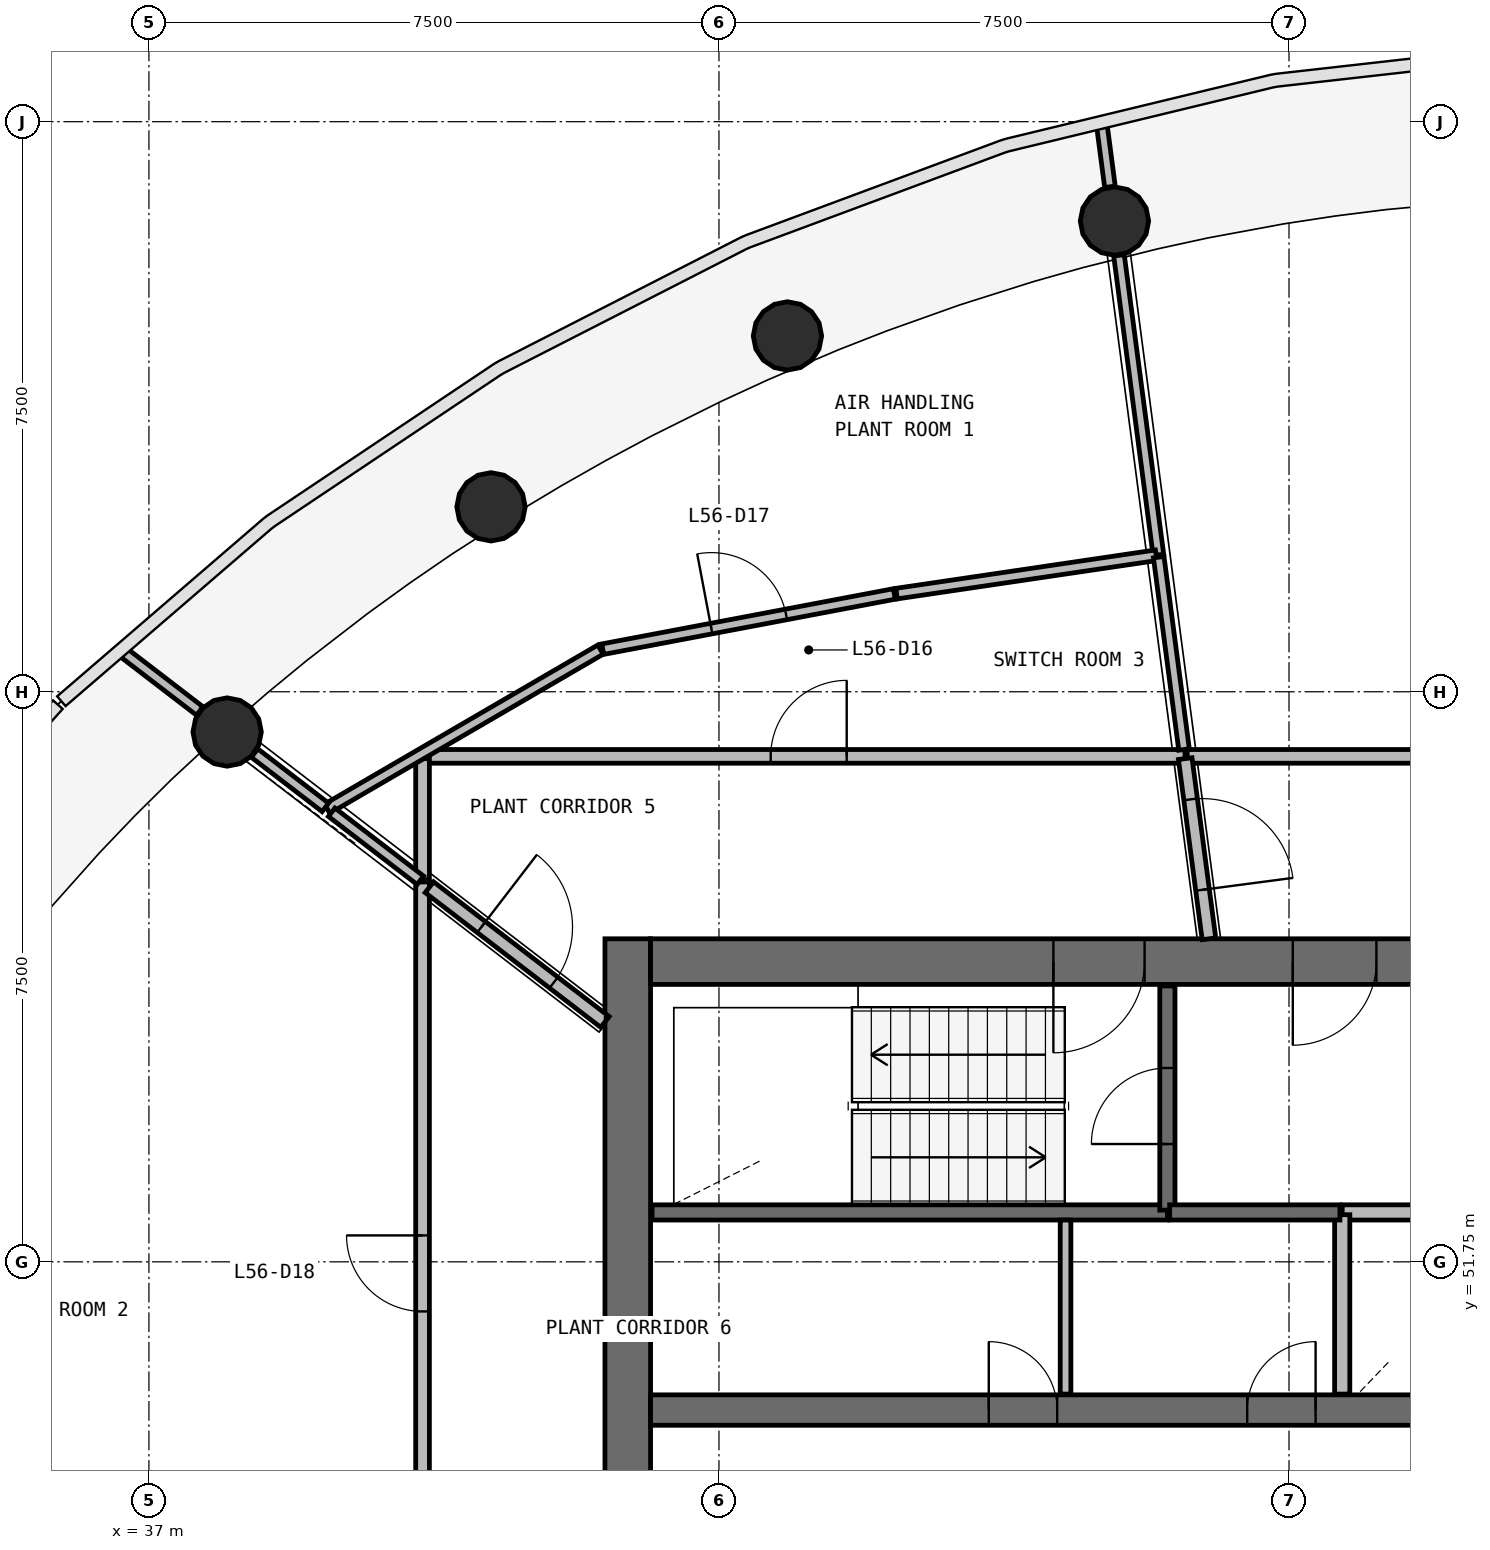
"""IFC4 building model, lengths in metres.
Left out: names, types, materials, properties, quantities, classifications, styles, units other than length and angle.
Written with IfcOpenShell. Run it as: python <this file> out.ifc"""

import sys

from ifc_helpers import new_model, si_unit, direction, frame, frame_2d, origin, origin_2d, place, context, subcontext, project, spatial, rectangle, circle, extrude, source, transform, mapped, element, fill, save


model = new_model("IFC4")
c1 = context("Model", 3, precision=1e-05, world=origin(), true_north=direction((0.0, 1.0)))
c2 = subcontext(c1, "Body", "Model", "MODEL_VIEW")
j1 = project(units=[si_unit("LENGTHUNIT", "METRE"), si_unit("PLANEANGLEUNIT", "RADIAN")], contexts=[c1])
p1 = place(None, origin())
s1 = spatial("IfcSite", under=j1, at=p1, CompositionType="ELEMENT")
p2 = place(p1, origin())
s2 = spatial("IfcBuilding", under=s1, at=p2, CompositionType="ELEMENT")
p3 = place(p2, frame((0.0, 0.0, 230.6)))
s3 = spatial("IfcBuildingStorey", under=s2, at=p3, CompositionType="ELEMENT", Elevation=230.6)
p4 = place(p3, frame((43.3, 56.0, 0.0), z_axis=(0.0, 0.0, 1.0), x_axis=(0.0, -1.0, 0.0)))
e1 = element("IfcWall", 1, at=p4, inside=s3, PredefinedType="SHEAR", context=c2, shape_type="SweptSolid", body=[
    extrude(rectangle(XDim=16.0, YDim=0.6, at=frame_2d((8.0, 0.0))), origin(), (0.0, 0.0, 1.0), 3.9),
])
p5 = place(p4, frame((7.1, 0.0, 0.0)))
e2 = element("IfcOpeningElement", 2, at=p5, cuts=e1, PredefinedType="OPENING", context=c2, shape_type="SweptSolid", body=[
    extrude(rectangle(XDim=1.8, YDim=2.1, at=frame_2d((0.9, 1.05))), frame((0.0, 0.31, 0.0), z_axis=(0.0, -1.0, 0.0), x_axis=(1.0, 0.0, 0.0)), (0.0, 0.0, 1.0), 0.62),
])
p6 = place(p3, frame((60.4, 55.7, 0.0), z_axis=(0.0, 0.0, 1.0), x_axis=(-1.0, 0.0, 0.0)))
e3 = element("IfcWall", 3, at=p6, inside=s3, PredefinedType="SHEAR", context=c2, shape_type="SweptSolid", body=[
    extrude(rectangle(XDim=16.8, YDim=0.6, at=frame_2d((8.4, 0.0))), origin(), (0.0, 0.0, 1.0), 3.9),
])
p7 = place(p6, frame((0.4, 0.0, 0.0)))
e4 = element("IfcOpeningElement", 4, at=p7, cuts=e3, PredefinedType="OPENING", context=c2, shape_type="SweptSolid", body=[
    extrude(rectangle(XDim=1.1, YDim=2.1, at=frame_2d((0.55, 1.05))), frame((0.0, 0.31, 0.0), z_axis=(0.0, -1.0, 0.0), x_axis=(1.0, 0.0, 0.0)), (0.0, 0.0, 1.0), 0.62),
])
p8 = place(p6, frame((10.3, 0.0, 0.0)))
e5 = element("IfcOpeningElement", 5, at=p8, cuts=e3, PredefinedType="OPENING", context=c2, shape_type="SweptSolid", body=[
    extrude(rectangle(XDim=1.2, YDim=2.1, at=frame_2d((0.6, 1.05))), frame((0.0, 0.31, 0.0), z_axis=(0.0, -1.0, 0.0), x_axis=(1.0, 0.0, 0.0)), (0.0, 0.0, 1.0), 0.62),
])
p9 = place(p6, frame((7.25, 0.0, 0.0)))
e6 = element("IfcOpeningElement", 6, at=p9, cuts=e3, PredefinedType="OPENING", context=c2, shape_type="SweptSolid", body=[
    extrude(rectangle(XDim=1.1, YDim=2.1, at=frame_2d((0.55, 1.05))), frame((0.0, 0.31, 0.0), z_axis=(0.0, -1.0, 0.0), x_axis=(1.0, 0.0, 0.0)), (0.0, 0.0, 1.0), 0.62),
])
p10 = place(p3, frame((43.6, 49.8, 0.0), z_axis=(0.0, 0.0, 1.0), x_axis=(1.0, 0.0, 0.0)))
e7 = element("IfcWall", 7, at=p10, inside=s3, PredefinedType="SHEAR", context=c2, shape_type="SweptSolid", body=[
    extrude(rectangle(XDim=16.8, YDim=0.4, at=frame_2d((8.4, 0.0))), origin(), (0.0, 0.0, 1.0), 3.9),
])
p11 = place(p10, frame((4.45, 0.0, 0.0)))
e8 = element("IfcOpeningElement", 8, at=p11, cuts=e7, PredefinedType="OPENING", context=c2, shape_type="SweptSolid", body=[
    extrude(rectangle(XDim=0.9, YDim=2.1, at=frame_2d((0.45, 1.05))), frame((0.0, 0.21, 0.0), z_axis=(0.0, -1.0, 0.0), x_axis=(1.0, 0.0, 0.0)), (0.0, 0.0, 1.0), 0.42),
])
p12 = place(p10, frame((7.85, 0.0, 0.0)))
e9 = element("IfcOpeningElement", 9, at=p12, cuts=e7, PredefinedType="OPENING", context=c2, shape_type="SweptSolid", body=[
    extrude(rectangle(XDim=0.9, YDim=2.1, at=frame_2d((0.45, 1.05))), frame((0.0, 0.21, 0.0), z_axis=(0.0, -1.0, 0.0), x_axis=(1.0, 0.0, 0.0)), (0.0, 0.0, 1.0), 0.42),
])
m1 = source(origin(), c2, "Body", "SweptSolid", [
    extrude(circle(Radius=0.45, at=origin_2d()), origin(), (0.0, 0.0, 1.0), 3.58),
])
for number, where, z_axis, x_axis in (
    (10, (49.704, 65.442, 0.0), (0.0, 0.0, 1.0), (1.0, 0.0, 0.0)),
    (11, (45.401, 63.931, 0.0), (0.0, 0.0, 1.0), (1.0, 0.0, 0.0)),
    (12, (41.501, 61.683, 0.0), (0.0, 0.0, 1.0), (1.0, 0.0, 0.0)),
    (13, (38.029, 58.72, 0.0), (0.0, 0.0, 1.0), (1.0, 0.0, 0.0)),
):
    element("IfcColumn", number, at=place(p3, frame(where, z_axis=z_axis, x_axis=x_axis)), inside=s3, PredefinedType="COLUMN", context=c2, shape_type="MappedRepresentation", body=[
        mapped(m1, transform((0.0, 0.0, 0.0), scale=1.0)),
    ])
p13 = place(p3, frame((43.62, 52.4, 0.0), z_axis=(0.0, 0.0, 1.0), x_axis=(1.0, 0.0, 0.0)))
e14 = element("IfcWall", 14, at=p13, inside=s3, PredefinedType="SOLIDWALL", context=c2, shape_type="SweptSolid", body=[
    extrude(rectangle(XDim=6.78, YDim=0.2, at=frame_2d((3.39, 0.0))), origin(), (0.0, 0.0, 1.0), 3.58),
])
p14 = place(p3, frame((50.4, 52.43, 0.0), z_axis=(0.0, 0.0, 1.0), x_axis=(0.0, 1.0, 0.0)))
e15 = element("IfcWall", 15, at=p14, inside=s3, PredefinedType="SOLIDWALL", context=c2, shape_type="SweptSolid", body=[
    extrude(rectangle(XDim=2.95, YDim=0.2, at=frame_2d((1.475, 0.0))), origin(), (0.0, 0.0, 1.0), 3.58),
])
p15 = place(p14, frame((0.87, 0.0, 0.0)))
e16 = element("IfcOpeningElement", 16, at=p15, cuts=e15, PredefinedType="OPENING", context=c2, shape_type="SweptSolid", body=[
    extrude(rectangle(XDim=1.0, YDim=2.1, at=frame_2d((0.5, 1.05))), frame((0.0, 0.11, 0.0), z_axis=(0.0, -1.0, 0.0), x_axis=(1.0, 0.0, 0.0)), (0.0, 0.0, 1.0), 0.22),
])
p16 = place(p3, frame((55.2, 52.4, 0.0), z_axis=(0.0, 0.0, 1.0), x_axis=(-1.0, 0.0, 0.0)))
e17 = element("IfcWall", 17, at=p16, inside=s3, PredefinedType="SOLIDWALL", context=c2, shape_type="SweptSolid", body=[
    extrude(rectangle(XDim=2.5, YDim=0.2, at=frame_2d((1.25, 0.0))), origin(), (0.0, 0.0, 1.0), 3.58),
])
p17 = place(p3, frame((52.7, 52.37, 0.0), z_axis=(0.0, 0.0, 1.0), x_axis=(0.0, -1.0, 0.0)))
e18 = element("IfcWall", 18, at=p17, inside=s3, PredefinedType="SOLIDWALL", context=c2, shape_type="SweptSolid", body=[
    extrude(rectangle(XDim=2.36, YDim=0.2, at=frame_2d((1.18, 0.0))), origin(), (0.0, 0.0, 1.0), 3.58),
])
p18 = place(p3, frame((50.43, 52.4, 0.0), z_axis=(0.0, 0.0, 1.0), x_axis=(1.0, 0.0, 0.0)))
e19 = element("IfcWall", 19, at=p18, inside=s3, PredefinedType="SOLIDWALL", context=c2, shape_type="SweptSolid", body=[
    extrude(rectangle(XDim=2.24, YDim=0.2, at=frame_2d((1.12, 0.0))), origin(), (0.0, 0.0, 1.0), 3.58),
])
p19 = place(p3, frame((40.6, 46.499, 0.0), z_axis=(0.0, 0.0, 1.0), x_axis=(0.0, 1.0, 0.0)))
e20 = element("IfcWall", 20, at=p19, inside=s3, PredefinedType="PARTITIONING", context=c2, shape_type="SweptSolid", body=[
    extrude(rectangle(XDim=10.248, YDim=0.18, at=frame_2d((5.124, 0.0))), origin(), (0.0, 0.0, 1.0), 2.38),
])
p20 = place(p19, frame((4.598, 0.0, 0.0)))
e21 = element("IfcOpeningElement", 21, at=p20, cuts=e20, PredefinedType="OPENING", context=c2, shape_type="SweptSolid", body=[
    extrude(rectangle(XDim=1.0, YDim=2.1, at=frame_2d((0.5, 1.05))), frame((0.0, 0.1, 0.0), z_axis=(0.0, -1.0, 0.0), x_axis=(1.0, 0.0, 0.0)), (0.0, 0.0, 1.0), 0.2),
])
p21 = place(p3, frame((40.6, 58.4, 0.0), z_axis=(0.0, 0.0, 1.0), x_axis=(1.0, 0.0, 0.0)))
e22 = element("IfcWall", 22, at=p21, inside=s3, PredefinedType="PARTITIONING", context=c2, shape_type="SweptSolid", body=[
    extrude(rectangle(XDim=10.031, YDim=0.18, at=frame_2d((5.015, 0.0))), origin(), (0.0, 0.0, 1.0), 2.38),
])
p22 = place(p21, frame((4.581, 0.0, 0.0)))
e23 = element("IfcOpeningElement", 23, at=p22, cuts=e22, PredefinedType="OPENING", context=c2, shape_type="SweptSolid", body=[
    extrude(rectangle(XDim=1.0, YDim=2.1, at=frame_2d((0.5, 1.05))), frame((0.0, 0.1, 0.0), z_axis=(0.0, -1.0, 0.0), x_axis=(1.0, 0.0, 0.0)), (0.0, 0.0, 1.0), 0.2),
])
p23 = place(p3, frame((50.661, 58.4, 0.0), z_axis=(0.0, 0.0, 1.0), x_axis=(1.0, 0.0, 0.0)))
e24 = element("IfcWall", 24, at=p23, inside=s3, PredefinedType="PARTITIONING", context=c2, shape_type="SweptSolid", body=[
    extrude(rectangle(XDim=9.319, YDim=0.18, at=frame_2d((4.66, 0.0))), origin(), (0.0, 0.0, 1.0), 2.38),
])
p24 = place(p23, frame((4.069, 0.0, 0.0)))
e25 = element("IfcOpeningElement", 25, at=p24, cuts=e24, PredefinedType="OPENING", context=c2, shape_type="SweptSolid", body=[
    extrude(rectangle(XDim=1.0, YDim=2.1, at=frame_2d((0.5, 1.05))), frame((0.0, 0.1, 0.0), z_axis=(0.0, -1.0, 0.0), x_axis=(1.0, 0.0, 0.0)), (0.0, 0.0, 1.0), 0.2),
])
p25 = place(p3, frame((40.69, 56.678, 0.0), z_axis=(0.0, 0.0, 1.0), x_axis=(0.793371480341, -0.608737787706, 0.0)))
e26 = element("IfcWall", 26, at=p25, inside=s3, PredefinedType="PARTITIONING", context=c2, shape_type="SweptSolid", body=[
    extrude(rectangle(XDim=2.912, YDim=0.18, at=frame_2d((1.456, 0.0))), origin(), (0.0, 0.0, 1.0), 2.38),
])
p26 = place(p25, frame((0.862, 0.0, 0.0)))
e27 = element("IfcOpeningElement", 27, at=p26, cuts=e26, PredefinedType="OPENING", context=c2, shape_type="SweptSolid", body=[
    extrude(rectangle(XDim=1.2, YDim=2.1, at=frame_2d((0.6, 1.05))), frame((0.0, 0.1, 0.0), z_axis=(0.0, -1.0, 0.0), x_axis=(1.0, 0.0, 0.0)), (0.0, 0.0, 1.0), 0.2),
])
p27 = place(p3, frame((50.635, 58.37, 0.0), z_axis=(0.0, 0.0, 1.0), x_axis=(0.130504701654, -0.991447690424, 0.0)))
e28 = element("IfcWall", 28, at=p27, inside=s3, PredefinedType="PARTITIONING", context=c2, shape_type="SweptSolid", body=[
    extrude(rectangle(XDim=2.391, YDim=0.18, at=frame_2d((1.195, 0.0))), origin(), (0.0, 0.0, 1.0), 2.38),
])
p28 = place(p27, frame((0.541, 0.0, 0.0)))
e29 = element("IfcOpeningElement", 29, at=p28, cuts=e28, PredefinedType="OPENING", context=c2, shape_type="SweptSolid", body=[
    extrude(rectangle(XDim=1.2, YDim=2.1, at=frame_2d((0.6, 1.05))), frame((0.0, 0.1, 0.0), z_axis=(0.0, -1.0, 0.0), x_axis=(1.0, 0.0, 0.0)), (0.0, 0.0, 1.0), 0.2),
])
p29 = place(p3, frame((40.6, 58.37, 0.0), z_axis=(0.0, 0.0, 1.0), x_axis=(0.0, -1.0, 0.0)))
e30 = element("IfcWall", 30, at=p29, inside=s3, PredefinedType="PARTITIONING", context=c2, shape_type="SweptSolid", body=[
    extrude(rectangle(XDim=1.593, YDim=0.18, at=frame_2d((0.796, 0.0))), origin(), (0.0, 0.0, 1.0), 2.38),
])
p30 = place(p3, frame((42.942, 59.805, 0.0), z_axis=(0.0, 0.0, 1.0), x_axis=(-0.864208311026, -0.503134172118, 0.0)))
e31 = element("IfcWall", 31, at=p30, inside=s3, PredefinedType="PARTITIONING", context=c2, shape_type="SweptSolid", body=[
    extrude(rectangle(XDim=4.162, YDim=0.14, at=frame_2d((2.081, 0.0))), origin(), (0.0, 0.0, 1.0), 2.38),
])
p31 = place(p3, frame((50.282, 61.05, 0.0), z_axis=(0.0, 0.0, 1.0), x_axis=(-0.130554588204, 0.991441122558, 0.0)))
e32 = element("IfcWall", 32, at=p31, inside=s3, PredefinedType="PARTITIONING", context=c2, shape_type="SweptSolid", body=[
    extrude(rectangle(XDim=3.976, YDim=0.14, at=frame_2d((1.988, 0.0))), origin(), (0.0, 0.0, 1.0), 2.38),
])
p32 = place(p3, frame((42.971, 59.811, 0.0), z_axis=(0.0, 0.0, 1.0), x_axis=(0.982553571564, 0.185979781176, 0.0)))
e33 = element("IfcWall", 33, at=p32, inside=s3, PredefinedType="PARTITIONING", context=c2, shape_type="SweptSolid", body=[
    extrude(rectangle(XDim=3.904, YDim=0.14, at=frame_2d((1.952, 0.0))), origin(), (0.0, 0.0, 1.0), 2.38),
])
p33 = place(p32, frame((1.454, 0.0, 0.0)))
e34 = element("IfcOpeningElement", 34, at=p33, cuts=e33, PredefinedType="OPENING", context=c2, shape_type="SweptSolid", body=[
    extrude(rectangle(XDim=1.0, YDim=2.1, at=frame_2d((0.5, 1.05))), frame((0.0, 0.08, 0.0), z_axis=(0.0, -1.0, 0.0), x_axis=(1.0, 0.0, 0.0)), (0.0, 0.0, 1.0), 0.16),
])
p34 = place(p3, frame((50.252, 61.046, 0.0), z_axis=(0.0, 0.0, 1.0), x_axis=(-0.989248976664, -0.146241109711, 0.0)))
e35 = element("IfcWall", 35, at=p34, inside=s3, PredefinedType="PARTITIONING", context=c2, shape_type="SweptSolid", body=[
    extrude(rectangle(XDim=3.452, YDim=0.14, at=frame_2d((1.726, 0.0))), origin(), (0.0, 0.0, 1.0), 2.38),
])
p35 = place(p3, frame((50.619, 58.49, 0.0), z_axis=(0.0, 0.0, 1.0), x_axis=(-0.130471833124, 0.991452016369, 0.0)))
e36 = element("IfcWall", 36, at=p35, inside=s3, PredefinedType="PARTITIONING", context=c2, shape_type="SweptSolid", body=[
    extrude(rectangle(XDim=2.552, YDim=0.14, at=frame_2d((1.276, 0.0))), origin(), (0.0, 0.0, 1.0), 2.38),
])
p36 = place(p3, frame((49.06, 50.01, 0.0), z_axis=(0.0, 0.0, 1.0), x_axis=(0.0, 1.0, 0.0)))
e37 = element("IfcWall", 37, at=p36, inside=s3, PredefinedType="PARTITIONING", context=c2, shape_type="SweptSolid", body=[
    extrude(rectangle(XDim=2.29, YDim=0.14, at=frame_2d((1.145, 0.0))), origin(), (0.0, 0.0, 1.0), 2.88),
])
p37 = place(p3, frame((40.571, 56.77, 0.0), z_axis=(0.0, 0.0, 1.0), x_axis=(-0.793395131444, 0.608706961847, 0.0)))
e38 = element("IfcWall", 38, at=p37, inside=s3, PredefinedType="PARTITIONING", context=c2, shape_type="SweptSolid", body=[
    extrude(rectangle(XDim=1.47, YDim=0.14, at=frame_2d((0.735, 0.0))), origin(), (0.0, 0.0, 1.0), 2.38),
])
p38 = place(p3, frame((37.668, 58.997, 0.0), z_axis=(0.0, 0.0, 1.0), x_axis=(-0.793408114576, 0.608690039121, 0.0)))
e39 = element("IfcWall", 39, at=p38, inside=s3, PredefinedType="PARTITIONING", context=c2, shape_type="SweptSolid", body=[
    extrude(rectangle(XDim=1.249, YDim=0.14, at=frame_2d((0.625, 0.0))), origin(), (0.0, 0.0, 1.0), 2.88),
])
p39 = place(p3, frame((39.321, 57.729, 0.0), z_axis=(0.0, 0.0, 1.0), x_axis=(-0.793388739829, 0.608715292655, 0.0)))
e40 = element("IfcWall", 40, at=p39, inside=s3, PredefinedType="PARTITIONING", context=c2, shape_type="SweptSolid", body=[
    extrude(rectangle(XDim=1.174, YDim=0.14, at=frame_2d((0.587, 0.0))), origin(), (0.0, 0.0, 1.0), 2.38),
])
p40 = place(p3, frame((49.644, 65.893, 0.0), z_axis=(0.0, 0.0, 1.0), x_axis=(-0.130414823496, 0.991459516981, 0.0)))
e41 = element("IfcWall", 41, at=p40, inside=s3, PredefinedType="PARTITIONING", context=c2, shape_type="SweptSolid", body=[
    extrude(rectangle(XDim=0.796, YDim=0.14, at=frame_2d((0.398, 0.0))), origin(), (0.0, 0.0, 1.0), 2.88),
])
m2 = source(origin(), c2, "Body", "SweptSolid", [
    extrude(rectangle(XDim=1.2, YDim=2.1, at=frame_2d((0.6, 1.05))), frame((0.0, 0.025, 0.0), z_axis=(0.0, -1.0, 0.0), x_axis=(1.0, 0.0, 0.0)), (0.0, 0.0, 1.0), 0.05),
])
p41 = place(p8, origin())
e42 = element("IfcDoor", 42, at=p41, inside=s3, OperationType="SINGLE_SWING_RIGHT", PredefinedType="DOOR", context=c2, shape_type="MappedRepresentation", body=[
    mapped(m2, transform((0.0, 0.0, 0.0), scale=1.0)),
])
fill(e5, e42)
m3 = source(origin(), c2, "Body", "SweptSolid", [
    extrude(rectangle(XDim=1.0, YDim=2.1, at=frame_2d((0.5, 1.05))), frame((0.0, 0.025, 0.0), z_axis=(0.0, -1.0, 0.0), x_axis=(1.0, 0.0, 0.0)), (0.0, 0.0, 1.0), 0.05),
])
p42 = place(p15, origin())
e43 = element("IfcDoor", 43, at=p42, inside=s3, OperationType="SINGLE_SWING_LEFT", PredefinedType="DOOR", context=c2, shape_type="MappedRepresentation", body=[
    mapped(m3, transform((0.0, 0.0, 0.0), scale=1.0)),
])
fill(e16, e43)
m4 = source(origin(), c2, "Body", "SweptSolid", [
    extrude(rectangle(XDim=1.1, YDim=2.1, at=frame_2d((0.55, 1.05))), frame((0.0, 0.025, 0.0), z_axis=(0.0, -1.0, 0.0), x_axis=(1.0, 0.0, 0.0)), (0.0, 0.0, 1.0), 0.05),
])
p43 = place(p9, origin())
e44 = element("IfcDoor", 44, at=p43, inside=s3, OperationType="SINGLE_SWING_RIGHT", PredefinedType="DOOR", context=c2, shape_type="MappedRepresentation", body=[
    mapped(m4, transform((0.0, 0.0, 0.0), scale=1.0)),
])
fill(e6, e44)
m5 = source(origin(), c2, "Body", "SweptSolid", [
    extrude(rectangle(XDim=1.0, YDim=2.1, at=frame_2d((0.5, 1.05))), frame((0.0, 0.025, 0.0), z_axis=(0.0, -1.0, 0.0), x_axis=(1.0, 0.0, 0.0)), (0.0, 0.0, 1.0), 0.05),
])
p44 = place(p22, origin())
e45 = element("IfcDoor", 45, at=p44, inside=s3, OperationType="SINGLE_SWING_RIGHT", PredefinedType="DOOR", context=c2, shape_type="MappedRepresentation", body=[
    mapped(m5, transform((0.0, 0.0, 0.0), scale=1.0)),
])
fill(e23, e45)
p45 = place(p33, origin())
e46 = element("IfcDoor", 46, at=p45, inside=s3, OperationType="SINGLE_SWING_LEFT", PredefinedType="DOOR", context=c2, shape_type="MappedRepresentation", body=[
    mapped(m5, transform((0.0, 0.0, 0.0), scale=1.0)),
])
fill(e34, e46)
p46 = place(p20, origin())
e47 = element("IfcDoor", 47, at=p46, inside=s3, OperationType="SINGLE_SWING_RIGHT", PredefinedType="DOOR", context=c2, shape_type="MappedRepresentation", body=[
    mapped(m5, transform((0.0, 0.0, 0.0), scale=1.0)),
])
fill(e21, e47)
m6 = source(origin(), c2, "Body", "SweptSolid", [
    extrude(rectangle(XDim=1.2, YDim=2.1, at=frame_2d((0.6, 1.05))), frame((0.0, 0.025, 0.0), z_axis=(0.0, -1.0, 0.0), x_axis=(1.0, 0.0, 0.0)), (0.0, 0.0, 1.0), 0.05),
])
p47 = place(p28, origin())
e48 = element("IfcDoor", 48, at=p47, inside=s3, OperationType="SINGLE_SWING_RIGHT", PredefinedType="DOOR", context=c2, shape_type="MappedRepresentation", body=[
    mapped(m6, transform((0.0, 0.0, 0.0), scale=1.0)),
])
fill(e29, e48)
p48 = place(p26, origin())
e49 = element("IfcDoor", 49, at=p48, inside=s3, OperationType="SINGLE_SWING_LEFT", PredefinedType="DOOR", context=c2, shape_type="MappedRepresentation", body=[
    mapped(m6, transform((0.0, 0.0, 0.0), scale=1.0)),
])
fill(e27, e49)
m7 = source(origin(), c2, "Body", "SweptSolid", [
    extrude(rectangle(XDim=0.9, YDim=2.1, at=frame_2d((0.45, 1.05))), frame((0.0, 0.025, 0.0), z_axis=(0.0, -1.0, 0.0), x_axis=(1.0, 0.0, 0.0)), (0.0, 0.0, 1.0), 0.05),
])
p49 = place(p11, origin())
e50 = element("IfcDoor", 50, at=p49, inside=s3, OperationType="SINGLE_SWING_LEFT", PredefinedType="DOOR", context=c2, shape_type="MappedRepresentation", body=[
    mapped(m7, transform((0.0, 0.0, 0.0), scale=1.0)),
])
fill(e8, e50)
p50 = place(p12, origin())
e51 = element("IfcDoor", 51, at=p50, inside=s3, OperationType="SINGLE_SWING_RIGHT", PredefinedType="DOOR", context=c2, shape_type="MappedRepresentation", body=[
    mapped(m7, transform((0.0, 0.0, 0.0), scale=1.0)),
])
fill(e9, e51)
save(model, sys.argv[1])
